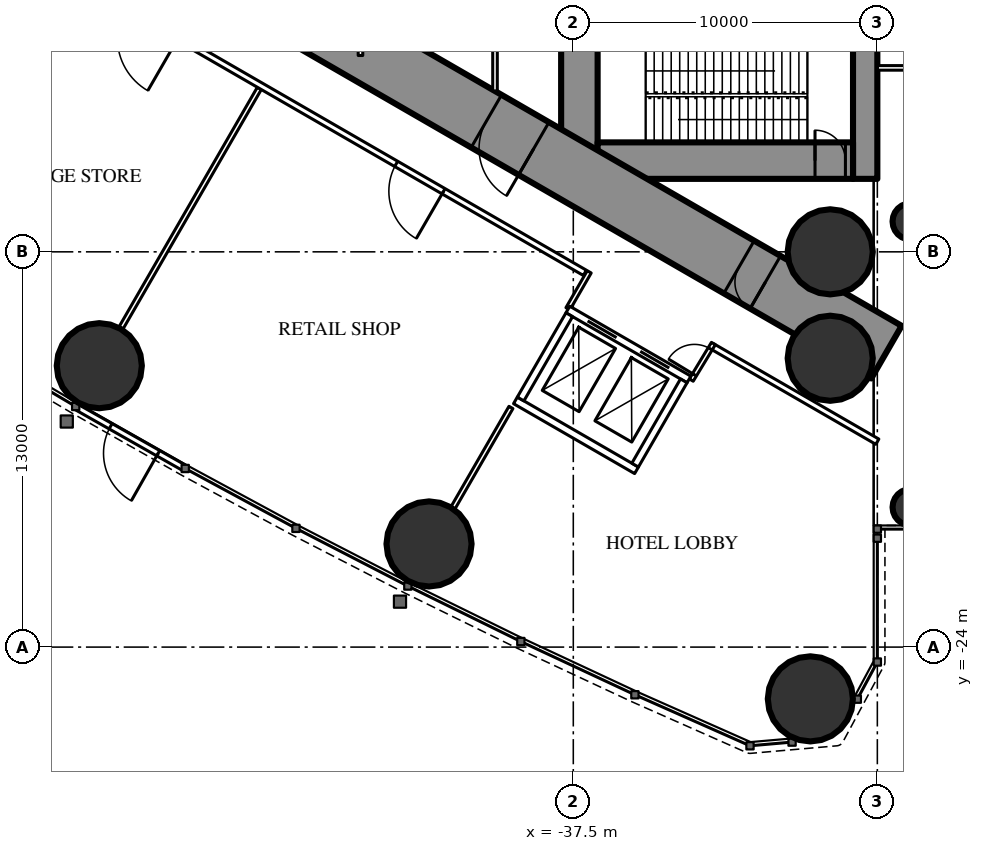
"""IFC4 building model, lengths in metres.
Left out: names, types, materials, properties, quantities, classifications, styles, units other than length and angle.
Written with IfcOpenShell. Run it as: python <this file> out.ifc"""

import sys

from ifc_helpers import new_model, si_unit, direction, frame, frame_2d, origin, origin_2d, place, context, subcontext, project, spatial, rectangle, circle, hollow_circle, extrude, element, fill, save


model = new_model("IFC4")
c1 = context("Model", 3, precision=1e-05, world=origin(), true_north=direction((0.0, 1.0)))
c2 = subcontext(c1, "Body", "Model", "MODEL_VIEW")
j1 = project(units=[si_unit("LENGTHUNIT", "METRE"), si_unit("PLANEANGLEUNIT", "RADIAN")], contexts=[c1])
p1 = place(None, origin())
s1 = spatial("IfcSite", under=j1, at=p1, CompositionType="ELEMENT")
p2 = place(p1, origin())
s2 = spatial("IfcBuilding", under=s1, at=p2, CompositionType="ELEMENT")
p3 = place(p2, origin())
s3 = spatial("IfcBuildingStorey", under=s2, at=p3, CompositionType="ELEMENT", Elevation=0.0)
for number, where, z_axis, x_axis in (
    (1, (-29.703, -25.703, 0.0), (0.0, 0.0, 1.0), (1.0, 0.0, 0.0)),
    (2, (-29.05, -11.0, 0.0), (0.0, 0.0, 1.0), (1.0, 0.0, 0.0)),
    (3, (-29.05, -14.5, 0.0), (0.0, 0.0, 1.0), (1.0, 0.0, 0.0)),
    (4, (-53.09, -14.745, 0.0), (0.0, 0.0, 1.0), (1.0, 0.0, 0.0)),
    (5, (-42.245, -20.607, 0.0), (0.0, 0.0, 1.0), (1.0, 0.0, 0.0)),
):
    element("IfcColumn", number, at=place(p3, frame(where, z_axis=z_axis, x_axis=x_axis)), inside=s3, PredefinedType="COLUMN", context=c2, shape_type="SweptSolid", body=[
        extrude(hollow_circle(Radius=1.4, WallThickness=0.12, at=origin_2d()), origin(), (0.0, 0.0, 1.0), 7.2),
    ])
p4 = place(p3, frame((-27.9, 8.6, 0.0), z_axis=(0.0, 0.0, 1.0), x_axis=(0.0, -1.0, 0.0)))
e6 = element("IfcWall", 6, at=p4, inside=s3, PredefinedType="SHEAR", context=c2, shape_type="SweptSolid", body=[
    extrude(rectangle(XDim=17.2, YDim=0.8, at=frame_2d((8.6, 0.0))), origin(), (0.0, 0.0, 1.0), 7.2),
])
p5 = place(p3, frame((-37.3, 8.6, 0.0), z_axis=(0.0, 0.0, 1.0), x_axis=(0.0, -1.0, 0.0)))
e7 = element("IfcWall", 7, at=p5, inside=s3, PredefinedType="SHEAR", context=c2, shape_type="SweptSolid", body=[
    extrude(rectangle(XDim=17.2, YDim=1.2, at=frame_2d((8.6, 0.0))), origin(), (0.0, 0.0, 1.0), 7.2),
])
p6 = place(p5, frame((7.7, 0.0, 0.0)))
e8 = element("IfcOpeningElement", 8, at=p6, cuts=e7, PredefinedType="OPENING", context=c2, shape_type="SweptSolid", body=[
    extrude(rectangle(XDim=1.8, YDim=2.2, at=frame_2d((0.9, 1.1))), frame((0.0, 0.61, 0.0), z_axis=(0.0, -1.0, 0.0), x_axis=(1.0, 0.0, 0.0)), (0.0, 0.0, 1.0), 1.22),
])
p7 = place(p3, frame((-28.3, -8.0, 0.0), z_axis=(0.0, 0.0, 1.0), x_axis=(-1.0, 0.0, 0.0)))
e9 = element("IfcWall", 9, at=p7, inside=s3, PredefinedType="SHEAR", context=c2, shape_type="SweptSolid", body=[
    extrude(rectangle(XDim=8.4, YDim=1.2, at=frame_2d((4.2, 0.0))), origin(), (0.0, 0.0, 1.0), 7.2),
])
p8 = place(p7, frame((0.25, 0.0, 0.0)))
e10 = element("IfcOpeningElement", 10, at=p8, cuts=e9, PredefinedType="OPENING", context=c2, shape_type="SweptSolid", body=[
    extrude(rectangle(XDim=1.0, YDim=2.2, at=frame_2d((0.5, 1.1))), frame((0.0, 0.61, 0.0), z_axis=(0.0, -1.0, 0.0), x_axis=(1.0, 0.0, 0.0)), (0.0, 0.0, 1.0), 1.22),
])
p9 = place(p3, frame((-27.2, -14.3, 0.0), z_axis=(0.0, 0.0, 1.0), x_axis=(-0.866024044937, 0.500002353585, 0.0)))
e11 = element("IfcWall", 11, at=p9, inside=s3, PredefinedType="SHEAR", context=c2, shape_type="SweptSolid", body=[
    extrude(rectangle(XDim=27.533, YDim=2.0, at=frame_2d((13.767, 0.0))), origin(), (0.0, 0.0, 1.0), 7.2),
])
p10 = place(p9, frame((4.6, 0.0, 0.0)))
e12 = element("IfcOpeningElement", 12, at=p10, cuts=e11, PredefinedType="OPENING", context=c2, shape_type="SweptSolid", body=[
    extrude(rectangle(XDim=1.0, YDim=2.2, at=frame_2d((0.5, 1.1))), frame((0.0, 1.01, 0.0), z_axis=(0.0, -1.0, 0.0), x_axis=(1.0, 0.0, 0.0)), (0.0, 0.0, 1.0), 2.02),
])
p11 = place(p9, frame((13.395, 0.0, 0.0)))
e13 = element("IfcOpeningElement", 13, at=p11, cuts=e11, PredefinedType="OPENING", context=c2, shape_type="SweptSolid", body=[
    extrude(rectangle(XDim=1.8, YDim=2.2, at=frame_2d((0.9, 1.1))), frame((0.0, 1.01, 0.0), z_axis=(0.0, -1.0, 0.0), x_axis=(1.0, 0.0, 0.0)), (0.0, 0.0, 1.0), 2.02),
])
for number, where, z_axis, x_axis in (
    (14, (-26.4, -19.4, 0.0), (0.0, 0.0, 1.0), (1.0, 0.0, 0.0)),
    (15, (-26.4, -10.0, 0.0), (0.0, 0.0, 1.0), (1.0, 0.0, 0.0)),
):
    element("IfcColumn", number, at=place(p3, frame(where, z_axis=z_axis, x_axis=x_axis)), inside=s3, PredefinedType="COLUMN", context=c2, shape_type="SweptSolid", body=[
        extrude(circle(Radius=0.6, at=origin_2d()), origin(), (0.0, 0.0, 1.0), 7.2),
    ])
p12 = place(p3, frame((-50.264, -18.126, 0.0), z_axis=(0.0, 0.0, 1.0), x_axis=(-0.870206768985, 0.49268669478, 0.0)))
e16 = element("IfcWall", 16, at=p12, inside=s3, PredefinedType="STANDARD", context=c2, shape_type="SweptSolid", body=[
    extrude(rectangle(XDim=4.14, YDim=0.2, at=frame_2d((2.07, 0.0))), origin(), (0.0, 0.0, 1.0), 6.85),
])
p13 = place(p12, frame((1.02, 0.0, 0.0)))
e17 = element("IfcOpeningElement", 17, at=p13, cuts=e16, PredefinedType="OPENING", context=c2, shape_type="SweptSolid", body=[
    extrude(rectangle(XDim=1.8, YDim=2.4, at=frame_2d((0.9, 1.2))), frame((0.0, 0.11, 0.0), z_axis=(0.0, -1.0, 0.0), x_axis=(1.0, 0.0, 0.0)), (0.0, 0.0, 1.0), 0.22),
])
p14 = place(p3, frame((-47.827, -5.624, 0.0), z_axis=(0.0, 0.0, 1.0), x_axis=(-0.499995404498, -0.866028056982, 0.0)))
e18 = element("IfcWall", 18, at=p14, inside=s3, PredefinedType="PARTITIONING", context=c2, shape_type="SweptSolid", body=[
    extrude(rectangle(XDim=9.11, YDim=0.15, at=frame_2d((4.555, 0.0))), origin(), (0.0, 0.0, 1.0), 5.85),
])
p15 = place(p3, frame((-39.551, -16.118, 0.0), z_axis=(0.0, 0.0, 1.0), x_axis=(-0.499986503906, -0.866033195618, 0.0)))
e19 = element("IfcWall", 19, at=p15, inside=s3, PredefinedType="PARTITIONING", context=c2, shape_type="SweptSolid", body=[
    extrude(rectangle(XDim=3.815, YDim=0.15, at=frame_2d((1.907, 0.0))), origin(), (0.0, 0.0, 1.0), 6.85),
])
p16 = place(p3, frame((-27.5, -17.244, 0.0), z_axis=(0.0, 0.0, 1.0), x_axis=(-0.866027347857, 0.499996632752, 0.0)))
e20 = element("IfcWall", 20, at=p16, inside=s3, PredefinedType="PARTITIONING", context=c2, shape_type="SweptSolid", body=[
    extrude(rectangle(XDim=6.269, YDim=0.2, at=frame_2d((3.135, 0.0))), origin(), (0.0, 0.0, 1.0), 6.85),
])
p17 = place(p3, frame((-37.12, -11.69, 0.0), z_axis=(0.0, 0.0, 1.0), x_axis=(-0.866028803602, 0.499994111297, 0.0)))
e21 = element("IfcWall", 21, at=p17, inside=s3, PredefinedType="PARTITIONING", context=c2, shape_type="SweptSolid", body=[
    extrude(rectangle(XDim=23.26, YDim=0.2, at=frame_2d((11.63, 0.0))), origin(), (0.0, 0.0, 1.0), 6.85),
])
p18 = place(p17, frame((20.909, 0.0, 0.0)))
e22 = element("IfcOpeningElement", 22, at=p18, cuts=e21, PredefinedType="OPENING", context=c2, shape_type="SweptSolid", body=[
    extrude(rectangle(XDim=1.8, YDim=2.2, at=frame_2d((0.9, 1.1))), frame((0.0, 0.11, 0.0), z_axis=(0.0, -1.0, 0.0), x_axis=(1.0, 0.0, 0.0)), (0.0, 0.0, 1.0), 0.22),
])
p19 = place(p17, frame((15.444, 0.0, 0.0)))
e23 = element("IfcOpeningElement", 23, at=p19, cuts=e21, PredefinedType="OPENING", context=c2, shape_type="SweptSolid", body=[
    extrude(rectangle(XDim=2.0, YDim=2.4, at=frame_2d((1.0, 1.2))), frame((0.0, 0.11, 0.0), z_axis=(0.0, -1.0, 0.0), x_axis=(1.0, 0.0, 0.0)), (0.0, 0.0, 1.0), 0.22),
])
p20 = place(p17, frame((5.365, 0.0, 0.0)))
e24 = element("IfcOpeningElement", 24, at=p20, cuts=e21, PredefinedType="OPENING", context=c2, shape_type="SweptSolid", body=[
    extrude(rectangle(XDim=1.8, YDim=2.2, at=frame_2d((0.9, 1.1))), frame((0.0, 0.11, 0.0), z_axis=(0.0, -1.0, 0.0), x_axis=(1.0, 0.0, 0.0)), (0.0, 0.0, 1.0), 0.22),
])
p21 = place(p3, frame((-36.976, -11.658, 0.0), z_axis=(0.0, 0.0, 1.0), x_axis=(-0.50008355685, -0.86597715684, 0.0)))
e25 = element("IfcWall", 25, at=p21, inside=s3, PredefinedType="PARTITIONING", context=c2, shape_type="SweptSolid", body=[
    extrude(rectangle(XDim=1.405, YDim=0.15, at=frame_2d((0.702, 0.0))), origin(), (0.0, 0.0, 1.0), 6.85),
])
p22 = place(p3, frame((-33.621, -15.218, 0.0), z_axis=(0.0, 0.0, 1.0), x_axis=(0.518424923641, 0.855123148177, 0.0)))
e26 = element("IfcWall", 26, at=p22, inside=s3, PredefinedType="PARTITIONING", context=c2, shape_type="SweptSolid", body=[
    extrude(rectangle(XDim=1.405, YDim=0.15, at=frame_2d((0.703, 0.0))), origin(), (0.0, 0.0, 1.0), 6.85),
])
p23 = place(p22, frame((0.203, 0.0, 0.0)))
e27 = element("IfcOpeningElement", 27, at=p23, cuts=e26, PredefinedType="OPENING", context=c2, shape_type="SweptSolid", body=[
    extrude(rectangle(XDim=1.0, YDim=2.2, at=frame_2d((0.5, 1.1))), frame((0.0, 0.085, 0.0), z_axis=(0.0, -1.0, 0.0), x_axis=(1.0, 0.0, 0.0)), (0.0, 0.0, 1.0), 0.17),
])
p24 = place(p3, frame((-40.075, 5.712, 0.0), z_axis=(0.0, 0.0, 1.0), x_axis=(0.0, -1.0, 0.0)))
e28 = element("IfcWall", 28, at=p24, inside=s3, PredefinedType="PARTITIONING", context=c2, shape_type="SweptSolid", body=[
    extrude(rectangle(XDim=11.424, YDim=0.15, at=frame_2d((5.712, 0.0))), origin(), (0.0, 0.0, 1.0), 6.85),
])
p25 = place(p24, frame((4.812, 0.0, 0.0)))
e29 = element("IfcOpeningElement", 29, at=p25, cuts=e28, PredefinedType="OPENING", context=c2, shape_type="SweptSolid", body=[
    extrude(rectangle(XDim=1.8, YDim=2.2, at=frame_2d((0.9, 1.1))), frame((0.0, 0.085, 0.0), z_axis=(0.0, -1.0, 0.0), x_axis=(1.0, 0.0, 0.0)), (0.0, 0.0, 1.0), 0.17),
])
p26 = place(p3, frame((-44.5, 4.543, 0.0), z_axis=(0.0, 0.0, 1.0), x_axis=(0.0, -1.0, 0.0)))
e30 = element("IfcWall", 30, at=p26, inside=s3, PredefinedType="PARTITIONING", context=c2, shape_type="SweptSolid", body=[
    extrude(rectangle(XDim=9.085, YDim=0.15, at=frame_2d((4.543, 0.0))), origin(), (0.0, 0.0, 1.0), 6.85),
])
p27 = place(p26, frame((4.043, 0.0, 0.0)))
e31 = element("IfcOpeningElement", 31, at=p27, cuts=e30, PredefinedType="OPENING", context=c2, shape_type="SweptSolid", body=[
    extrude(rectangle(XDim=1.0, YDim=2.2, at=frame_2d((0.5, 1.1))), frame((0.0, 0.085, 0.0), z_axis=(0.0, -1.0, 0.0), x_axis=(1.0, 0.0, 0.0)), (0.0, 0.0, 1.0), 0.17),
])
p28 = place(p3, frame((-27.5, -4.95, 0.0), z_axis=(0.0, 0.0, 1.0), x_axis=(1.0, 0.0, 0.0)))
e32 = element("IfcWall", 32, at=p28, inside=s3, PredefinedType="PARTITIONING", context=c2, shape_type="SweptSolid", body=[
    extrude(rectangle(XDim=22.875, YDim=0.15, at=frame_2d((11.438, 0.0))), origin(), (0.0, 0.0, 1.0), 5.85),
])
p29 = place(p28, frame((9.1, 0.0, 0.0)))
e33 = element("IfcOpeningElement", 33, at=p29, cuts=e32, PredefinedType="OPENING", context=c2, shape_type="SweptSolid", body=[
    extrude(rectangle(XDim=1.8, YDim=2.2, at=frame_2d((0.9, 1.1))), frame((0.0, 0.085, 0.0), z_axis=(0.0, -1.0, 0.0), x_axis=(1.0, 0.0, 0.0)), (0.0, 0.0, 1.0), 0.17),
])
p30 = place(p3, frame((-33.696, -15.197, 0.0), z_axis=(0.0, 0.0, 1.0), x_axis=(-0.865976953817, 0.500083908417, 0.0)))
e34 = element("IfcWall", 34, at=p30, inside=s3, PredefinedType="PARTITIONING", context=c2, shape_type="SweptSolid", body=[
    extrude(rectangle(XDim=4.599, YDim=0.25, at=frame_2d((2.3, 0.0))), origin(), (0.0, 0.0, 1.0), 6.85),
])
p31 = place(p30, frame((0.75, 0.0, 0.0)))
e35 = element("IfcOpeningElement", 35, at=p31, cuts=e34, PredefinedType="OPENING", context=c2, shape_type="SweptSolid", body=[
    extrude(rectangle(XDim=1.1, YDim=2.2, at=frame_2d((0.55, 1.1))), frame((0.0, 0.135, 0.0), z_axis=(0.0, -1.0, 0.0), x_axis=(1.0, 0.0, 0.0)), (0.0, 0.0, 1.0), 0.27),
])
p32 = place(p30, frame((2.75, 0.0, 0.0)))
e36 = element("IfcOpeningElement", 36, at=p32, cuts=e34, PredefinedType="OPENING", context=c2, shape_type="SweptSolid", body=[
    extrude(rectangle(XDim=1.1, YDim=2.2, at=frame_2d((0.55, 1.1))), frame((0.0, 0.135, 0.0), z_axis=(0.0, -1.0, 0.0), x_axis=(1.0, 0.0, 0.0)), (0.0, 0.0, 1.0), 0.27),
])
p33 = place(p3, frame((-35.42, -18.186, 0.0), z_axis=(0.0, 0.0, 1.0), x_axis=(-0.865990227814, 0.50006092162, 0.0)))
e37 = element("IfcWall", 37, at=p33, inside=s3, PredefinedType="PARTITIONING", context=c2, shape_type="SweptSolid", body=[
    extrude(rectangle(XDim=4.6, YDim=0.25, at=frame_2d((2.3, 0.0))), origin(), (0.0, 0.0, 1.0), 6.85),
])
p34 = place(p3, frame((-33.866, -15.243, 0.0), z_axis=(0.0, 0.0, 1.0), x_axis=(-0.499929347863, -0.866066190972, 0.0)))
e38 = element("IfcWall", 38, at=p34, inside=s3, PredefinedType="PARTITIONING", context=c2, shape_type="SweptSolid", body=[
    extrude(rectangle(XDim=3.201, YDim=0.25, at=frame_2d((1.6, 0.0))), origin(), (0.0, 0.0, 1.0), 6.85),
])
p35 = place(p3, frame((-37.633, -13.068, 0.0), z_axis=(0.0, 0.0, 1.0), x_axis=(-0.499872130319, -0.866099216793, 0.0)))
e39 = element("IfcWall", 39, at=p35, inside=s3, PredefinedType="PARTITIONING", context=c2, shape_type="SweptSolid", body=[
    extrude(rectangle(XDim=3.2, YDim=0.25, at=frame_2d((1.6, 0.0))), origin(), (0.0, 0.0, 1.0), 6.85),
])
p36 = place(p13, origin())
e40 = element("IfcDoor", 40, at=p36, inside=s3, OperationType="SINGLE_SWING_LEFT", PredefinedType="DOOR", context=c2, shape_type="SweptSolid", body=[
    extrude(rectangle(XDim=1.8, YDim=2.4, at=frame_2d((0.9, 1.2))), frame((0.0, 0.025, 0.0), z_axis=(0.0, -1.0, 0.0), x_axis=(1.0, 0.0, 0.0)), (0.0, 0.0, 1.0), 0.05),
])
fill(e17, e40)
p37 = place(p20, origin())
e41 = element("IfcDoor", 41, at=p37, inside=s3, OperationType="DOUBLE_DOOR_SINGLE_SWING", PredefinedType="DOOR", context=c2, shape_type="SweptSolid", body=[
    extrude(rectangle(XDim=1.8, YDim=2.2, at=frame_2d((0.9, 1.1))), frame((0.0, 0.025, 0.0), z_axis=(0.0, -1.0, 0.0), x_axis=(1.0, 0.0, 0.0)), (0.0, 0.0, 1.0), 0.05),
])
fill(e24, e41)
p38 = place(p23, origin())
e42 = element("IfcDoor", 42, at=p38, inside=s3, OperationType="SINGLE_SWING_LEFT", PredefinedType="DOOR", context=c2, shape_type="SweptSolid", body=[
    extrude(rectangle(XDim=1.0, YDim=2.2, at=frame_2d((0.5, 1.1))), frame((0.0, 0.025, 0.0), z_axis=(0.0, -1.0, 0.0), x_axis=(1.0, 0.0, 0.0)), (0.0, 0.0, 1.0), 0.05),
])
fill(e27, e42)
p39 = place(p10, origin())
e43 = element("IfcDoor", 43, at=p39, inside=s3, OperationType="SINGLE_SWING_LEFT", PredefinedType="DOOR", context=c2, shape_type="SweptSolid", body=[
    extrude(rectangle(XDim=1.0, YDim=2.2, at=frame_2d((0.5, 1.1))), frame((0.0, 0.025, 0.0), z_axis=(0.0, -1.0, 0.0), x_axis=(1.0, 0.0, 0.0)), (0.0, 0.0, 1.0), 0.05),
])
fill(e12, e43)
p40 = place(p11, origin())
e44 = element("IfcDoor", 44, at=p40, inside=s3, OperationType="DOUBLE_DOOR_SINGLE_SWING", PredefinedType="DOOR", context=c2, shape_type="SweptSolid", body=[
    extrude(rectangle(XDim=1.8, YDim=2.2, at=frame_2d((0.9, 1.1))), frame((0.0, 0.025, 0.0), z_axis=(0.0, -1.0, 0.0), x_axis=(1.0, 0.0, 0.0)), (0.0, 0.0, 1.0), 0.05),
])
fill(e13, e44)
p41 = place(p8, origin())
e45 = element("IfcDoor", 45, at=p41, inside=s3, OperationType="SINGLE_SWING_RIGHT", PredefinedType="DOOR", context=c2, shape_type="SweptSolid", body=[
    extrude(rectangle(XDim=1.0, YDim=2.2, at=frame_2d((0.5, 1.1))), frame((0.0, 0.025, 0.0), z_axis=(0.0, -1.0, 0.0), x_axis=(1.0, 0.0, 0.0)), (0.0, 0.0, 1.0), 0.05),
])
fill(e10, e45)
p42 = place(p31, origin())
e46 = element("IfcDoor", 46, at=p42, inside=s3, OperationType="DOUBLE_DOOR_SLIDING", PredefinedType="USERDEFINED", context=c2, shape_type="SweptSolid", body=[
    extrude(rectangle(XDim=1.1, YDim=2.2, at=frame_2d((0.55, 1.1))), frame((0.0, 0.025, 0.0), z_axis=(0.0, -1.0, 0.0), x_axis=(1.0, 0.0, 0.0)), (0.0, 0.0, 1.0), 0.05),
])
fill(e35, e46)
p43 = place(p32, origin())
e47 = element("IfcDoor", 47, at=p43, inside=s3, OperationType="DOUBLE_DOOR_SLIDING", PredefinedType="USERDEFINED", context=c2, shape_type="SweptSolid", body=[
    extrude(rectangle(XDim=1.1, YDim=2.2, at=frame_2d((0.55, 1.1))), frame((0.0, 0.025, 0.0), z_axis=(0.0, -1.0, 0.0), x_axis=(1.0, 0.0, 0.0)), (0.0, 0.0, 1.0), 0.05),
])
fill(e36, e47)
save(model, sys.argv[1])
